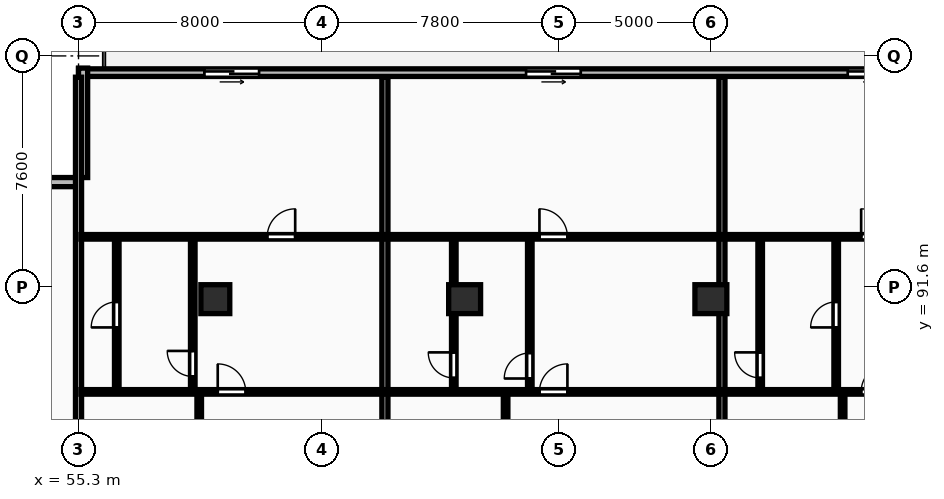
"""IFC4 building model, lengths in metres.
Left out: names, types, materials, properties, quantities, classifications, styles, units other than length and angle.
Written with IfcOpenShell. Run it as: python <this file> out.ifc"""

import sys

from ifc_helpers import new_model, si_unit, direction, frame, frame_2d, origin, origin_2d, place, context, subcontext, project, spatial, rectangle, circle, extrude, element, fill, save


model = new_model("IFC4")
c1 = context("Model", 3, precision=1e-05, world=origin(), true_north=direction((0.0, 1.0)))
c2 = subcontext(c1, "Body", "Model", "MODEL_VIEW")
j1 = project(units=[si_unit("LENGTHUNIT", "METRE"), si_unit("PLANEANGLEUNIT", "RADIAN")], contexts=[c1])
p1 = place(None, origin())
s1 = spatial("IfcSite", under=j1, at=p1, CompositionType="ELEMENT")
p2 = place(p1, origin())
s2 = spatial("IfcBuilding", under=s1, at=p2, CompositionType="ELEMENT")
p3 = place(p2, frame((0.0, 0.0, 24.0)))
s3 = spatial("IfcBuildingStorey", under=s2, at=p3, CompositionType="ELEMENT", Elevation=24.0)
p4 = place(p3, frame((59.8, 91.2, 0.0), z_axis=(0.0, 0.0, 1.0), x_axis=(1.0, 0.0, 0.0)))
e1 = element("IfcColumn", 1, at=p4, inside=s3, PredefinedType="COLUMN", context=c2, shape_type="SweptSolid", body=[
    extrude(circle(Radius=0.475, at=origin_2d()), origin(), (0.0, 0.0, 1.0), 3.25),
])
for number, where, z_axis, x_axis in (
    (2, (68.0, 91.2, 0.0), (0.0, 0.0, 1.0), (1.0, 0.0, 0.0)),
    (3, (76.1, 91.2, 0.0), (0.0, 0.0, 1.0), (1.0, 0.0, 0.0)),
):
    element("IfcColumn", number, at=place(p3, frame(where, z_axis=z_axis, x_axis=x_axis)), inside=s3, PredefinedType="COLUMN", context=c2, shape_type="SweptSolid", body=[
        extrude(rectangle(XDim=1.05, YDim=0.95, at=origin_2d()), origin(), (0.0, 0.0, 1.0), 3.25),
    ])
p5 = place(p3, frame((132.9, 98.65, 0.0), z_axis=(0.0, 0.0, 1.0), x_axis=(-1.0, 0.0, 0.0)))
e4 = element("IfcWall", 4, at=p5, inside=s3, PredefinedType="STANDARD", context=c2, shape_type="SweptSolid", body=[
    extrude(rectangle(XDim=77.6, YDim=0.25, at=frame_2d((38.8, 0.0))), origin(), (0.0, 0.0, 1.0), 2.97),
])
p6 = place(p5, frame((71.661, 0.0, 0.0)))
e5 = element("IfcOpeningElement", 5, at=p6, cuts=e4, PredefinedType="OPENING", context=c2, shape_type="SweptSolid", body=[
    extrude(rectangle(XDim=1.8, YDim=2.2, at=frame_2d((0.9, 1.1))), frame((0.0, 0.135, 0.0), z_axis=(0.0, -1.0, 0.0), x_axis=(1.0, 0.0, 0.0)), (0.0, 0.0, 1.0), 0.27),
])
p7 = place(p5, frame((61.079, 0.0, 0.0)))
e6 = element("IfcOpeningElement", 6, at=p7, cuts=e4, PredefinedType="OPENING", context=c2, shape_type="SweptSolid", body=[
    extrude(rectangle(XDim=1.8, YDim=2.2, at=frame_2d((0.9, 1.1))), frame((0.0, 0.135, 0.0), z_axis=(0.0, -1.0, 0.0), x_axis=(1.0, 0.0, 0.0)), (0.0, 0.0, 1.0), 0.27),
])
p8 = place(p5, frame((50.498, 0.0, 0.0)))
e7 = element("IfcOpeningElement", 7, at=p8, cuts=e4, PredefinedType="OPENING", context=c2, shape_type="SweptSolid", body=[
    extrude(rectangle(XDim=1.8, YDim=2.2, at=frame_2d((0.9, 1.1))), frame((0.0, 0.135, 0.0), z_axis=(0.0, -1.0, 0.0), x_axis=(1.0, 0.0, 0.0)), (0.0, 0.0, 1.0), 0.27),
])
p9 = place(p5, frame((39.412, 0.0, 0.0)))
e8 = element("IfcOpeningElement", 8, at=p9, cuts=e4, PredefinedType="OPENING", context=c2, shape_type="SweptSolid", body=[
    extrude(rectangle(XDim=1.8, YDim=2.2, at=frame_2d((0.9, 1.1))), frame((0.0, 0.135, 0.0), z_axis=(0.0, -1.0, 0.0), x_axis=(1.0, 0.0, 0.0)), (0.0, 0.0, 1.0), 0.27),
])
p10 = place(p5, frame((28.326, 0.0, 0.0)))
e9 = element("IfcOpeningElement", 9, at=p10, cuts=e4, PredefinedType="OPENING", context=c2, shape_type="SweptSolid", body=[
    extrude(rectangle(XDim=1.8, YDim=2.2, at=frame_2d((0.9, 1.1))), frame((0.0, 0.135, 0.0), z_axis=(0.0, -1.0, 0.0), x_axis=(1.0, 0.0, 0.0)), (0.0, 0.0, 1.0), 0.27),
])
p11 = place(p5, frame((17.744, 0.0, 0.0)))
e10 = element("IfcOpeningElement", 10, at=p11, cuts=e4, PredefinedType="OPENING", context=c2, shape_type="SweptSolid", body=[
    extrude(rectangle(XDim=1.8, YDim=2.2, at=frame_2d((0.9, 1.1))), frame((0.0, 0.135, 0.0), z_axis=(0.0, -1.0, 0.0), x_axis=(1.0, 0.0, 0.0)), (0.0, 0.0, 1.0), 0.27),
])
p12 = place(p5, frame((6.901, 0.0, 0.0)))
e11 = element("IfcOpeningElement", 11, at=p12, cuts=e4, PredefinedType="OPENING", context=c2, shape_type="SweptSolid", body=[
    extrude(rectangle(XDim=1.8, YDim=2.2, at=frame_2d((0.9, 1.1))), frame((0.0, 0.135, 0.0), z_axis=(0.0, -1.0, 0.0), x_axis=(1.0, 0.0, 0.0)), (0.0, 0.0, 1.0), 0.27),
])
p13 = place(p5, frame((0.6, 0.0, 0.85)))
e12 = element("IfcOpeningElement", 12, at=p13, cuts=e4, PredefinedType="OPENING", context=c2, shape_type="SweptSolid", body=[
    extrude(rectangle(XDim=1.8, YDim=1.8, at=frame_2d((0.9, 0.9))), frame((0.0, 0.135, 0.0), z_axis=(0.0, -1.0, 0.0), x_axis=(1.0, 0.0, 0.0)), (0.0, 0.0, 1.0), 0.27),
])
for number, where, z_axis, x_axis in (
    (13, (55.45, 98.8, 0.0), (0.0, 0.0, 1.0), (0.0, -1.0, 0.0)),
    (14, (55.3, 95.05, 0.0), (0.0, 0.0, 1.0), (-1.0, 0.0, 0.0)),
):
    element("IfcWall", number, at=place(p3, frame(where, z_axis=z_axis, x_axis=x_axis)), inside=s3, PredefinedType="STANDARD", context=c2, shape_type="SweptSolid", body=[
        extrude(rectangle(XDim=3.6, YDim=0.3, at=frame_2d((1.8, 0.0))), origin(), (0.0, 0.0, 1.0), 2.97),
    ])
for number, where, z_axis, x_axis in (
    (15, (55.3, 69.43, 0.0), (0.0, 0.0, 1.0), (0.0, 1.0, 0.0)),
    (16, (65.378, 69.43, 0.0), (0.0, 0.0, 1.0), (0.0, 1.0, 0.0)),
):
    element("IfcWall", number, at=place(p3, frame(where, z_axis=z_axis, x_axis=x_axis)), inside=s3, PredefinedType="PARTITIONING", context=c2, shape_type="SweptSolid", body=[
        extrude(rectangle(XDim=29.07, YDim=0.2, at=frame_2d((14.535, 0.0))), origin(), (0.0, 0.0, 1.0), 2.97),
    ])
p14 = place(p3, frame((59.27, 69.41, 0.0), z_axis=(0.0, 0.0, 1.0), x_axis=(0.0, 1.0, 0.0)))
e17 = element("IfcWall", 17, at=p14, inside=s3, PredefinedType="PARTITIONING", context=c2, shape_type="SweptSolid", body=[
    extrude(rectangle(XDim=18.7, YDim=0.15, at=frame_2d((9.35, 0.0))), origin(), (0.0, 0.0, 1.0), 2.97),
])
p15 = place(p14, frame((7.59, 0.0, 0.0)))
e18 = element("IfcOpeningElement", 18, at=p15, cuts=e17, PredefinedType="OPENING", context=c2, shape_type="SweptSolid", body=[
    extrude(rectangle(XDim=0.88, YDim=2.06, at=frame_2d((0.44, 1.03))), frame((0.0, 0.085, 0.0), z_axis=(0.0, -1.0, 0.0), x_axis=(1.0, 0.0, 0.0)), (0.0, 0.0, 1.0), 0.17),
])
p16 = place(p3, frame((56.558, 88.19, 0.0), z_axis=(0.0, 0.0, 1.0), x_axis=(0.0, 1.0, 0.0)))
e19 = element("IfcWall", 19, at=p16, inside=s3, PredefinedType="PARTITIONING", context=c2, shape_type="SweptSolid", body=[
    extrude(rectangle(XDim=5.0, YDim=0.15, at=frame_2d((2.5, 0.0))), origin(), (0.0, 0.0, 1.0), 2.97),
])
p17 = place(p16, frame((2.08, 0.0, 0.0)))
e20 = element("IfcOpeningElement", 20, at=p17, cuts=e19, PredefinedType="OPENING", context=c2, shape_type="SweptSolid", body=[
    extrude(rectangle(XDim=0.84, YDim=2.04, at=frame_2d((0.42, 1.02))), frame((0.0, 0.085, 0.0), z_axis=(0.0, -1.0, 0.0), x_axis=(1.0, 0.0, 0.0)), (0.0, 0.0, 1.0), 0.17),
])
p18 = place(p3, frame((59.058, 88.19, 0.0), z_axis=(0.0, 0.0, 1.0), x_axis=(0.0, 1.0, 0.0)))
e21 = element("IfcWall", 21, at=p18, inside=s3, PredefinedType="PARTITIONING", context=c2, shape_type="SweptSolid", body=[
    extrude(rectangle(XDim=5.0, YDim=0.15, at=frame_2d((2.5, 0.0))), origin(), (0.0, 0.0, 1.0), 2.97),
])
p19 = place(p18, frame((0.467, 0.0, 0.0)))
e22 = element("IfcOpeningElement", 22, at=p19, cuts=e21, PredefinedType="OPENING", context=c2, shape_type="SweptSolid", body=[
    extrude(rectangle(XDim=0.84, YDim=2.04, at=frame_2d((0.42, 1.02))), frame((0.0, 0.085, 0.0), z_axis=(0.0, -1.0, 0.0), x_axis=(1.0, 0.0, 0.0)), (0.0, 0.0, 1.0), 0.17),
])
p20 = place(p3, frame((55.38, 88.15, 0.0), z_axis=(0.0, 0.0, 1.0), x_axis=(1.0, 0.0, 0.0)))
e23 = element("IfcWall", 23, at=p20, inside=s3, PredefinedType="PARTITIONING", context=c2, shape_type="SweptSolid", body=[
    extrude(rectangle(XDim=9.918, YDim=0.15, at=frame_2d((4.959, 0.0))), origin(), (0.0, 0.0, 1.0), 2.97),
])
p21 = place(p20, frame((4.499, 0.0, 0.0)))
e24 = element("IfcOpeningElement", 24, at=p21, cuts=e23, PredefinedType="OPENING", context=c2, shape_type="SweptSolid", body=[
    extrude(rectangle(XDim=0.92, YDim=2.08, at=frame_2d((0.46, 1.04))), frame((0.0, 0.085, 0.0), z_axis=(0.0, -1.0, 0.0), x_axis=(1.0, 0.0, 0.0)), (0.0, 0.0, 1.0), 0.17),
])
p22 = place(p3, frame((55.38, 93.25, 0.0), z_axis=(0.0, 0.0, 1.0), x_axis=(1.0, 0.0, 0.0)))
e25 = element("IfcWall", 25, at=p22, inside=s3, PredefinedType="PARTITIONING", context=c2, shape_type="SweptSolid", body=[
    extrude(rectangle(XDim=9.918, YDim=0.15, at=frame_2d((4.959, 0.0))), origin(), (0.0, 0.0, 1.0), 2.97),
])
p23 = place(p22, frame((6.127, 0.0, 0.0)))
e26 = element("IfcOpeningElement", 26, at=p23, cuts=e25, PredefinedType="OPENING", context=c2, shape_type="SweptSolid", body=[
    extrude(rectangle(XDim=0.92, YDim=2.08, at=frame_2d((0.46, 1.04))), frame((0.0, 0.085, 0.0), z_axis=(0.0, -1.0, 0.0), x_axis=(1.0, 0.0, 0.0)), (0.0, 0.0, 1.0), 0.17),
])
p24 = place(p3, frame((76.464, 69.43, 0.0), z_axis=(0.0, 0.0, 1.0), x_axis=(0.0, 1.0, 0.0)))
e27 = element("IfcWall", 27, at=p24, inside=s3, PredefinedType="PARTITIONING", context=c2, shape_type="SweptSolid", body=[
    extrude(rectangle(XDim=29.07, YDim=0.2, at=frame_2d((14.535, 0.0))), origin(), (0.0, 0.0, 1.0), 2.22),
])
p25 = place(p3, frame((69.348, 69.41, 0.0), z_axis=(0.0, 0.0, 1.0), x_axis=(0.0, 1.0, 0.0)))
e28 = element("IfcWall", 28, at=p25, inside=s3, PredefinedType="PARTITIONING", context=c2, shape_type="SweptSolid", body=[
    extrude(rectangle(XDim=18.7, YDim=0.15, at=frame_2d((9.35, 0.0))), origin(), (0.0, 0.0, 1.0), 2.97),
])
p26 = place(p25, frame((7.595, 0.0, 0.0)))
e29 = element("IfcOpeningElement", 29, at=p26, cuts=e28, PredefinedType="OPENING", context=c2, shape_type="SweptSolid", body=[
    extrude(rectangle(XDim=0.88, YDim=2.06, at=frame_2d((0.44, 1.03))), frame((0.0, 0.085, 0.0), z_axis=(0.0, -1.0, 0.0), x_axis=(1.0, 0.0, 0.0)), (0.0, 0.0, 1.0), 0.17),
])
p27 = place(p3, frame((67.644, 88.19, 0.0), z_axis=(0.0, 0.0, 1.0), x_axis=(0.0, 1.0, 0.0)))
e30 = element("IfcWall", 30, at=p27, inside=s3, PredefinedType="PARTITIONING", context=c2, shape_type="SweptSolid", body=[
    extrude(rectangle(XDim=5.0, YDim=0.15, at=frame_2d((2.5, 0.0))), origin(), (0.0, 0.0, 1.0), 2.22),
])
p28 = place(p27, frame((0.419, 0.0, 0.0)))
e31 = element("IfcOpeningElement", 31, at=p28, cuts=e30, PredefinedType="OPENING", context=c2, shape_type="SweptSolid", body=[
    extrude(rectangle(XDim=0.84, YDim=2.04, at=frame_2d((0.42, 1.02))), frame((0.0, 0.085, 0.0), z_axis=(0.0, -1.0, 0.0), x_axis=(1.0, 0.0, 0.0)), (0.0, 0.0, 1.0), 0.17),
])
p29 = place(p3, frame((70.144, 88.19, 0.0), z_axis=(0.0, 0.0, 1.0), x_axis=(0.0, 1.0, 0.0)))
e32 = element("IfcWall", 32, at=p29, inside=s3, PredefinedType="PARTITIONING", context=c2, shape_type="SweptSolid", body=[
    extrude(rectangle(XDim=5.0, YDim=0.15, at=frame_2d((2.5, 0.0))), origin(), (0.0, 0.0, 1.0), 2.97),
])
p30 = place(p29, frame((0.4, 0.0, 0.0)))
e33 = element("IfcOpeningElement", 33, at=p30, cuts=e32, PredefinedType="OPENING", context=c2, shape_type="SweptSolid", body=[
    extrude(rectangle(XDim=0.84, YDim=2.04, at=frame_2d((0.42, 1.02))), frame((0.0, 0.085, 0.0), z_axis=(0.0, -1.0, 0.0), x_axis=(1.0, 0.0, 0.0)), (0.0, 0.0, 1.0), 0.17),
])
p31 = place(p3, frame((65.458, 88.15, 0.0), z_axis=(0.0, 0.0, 1.0), x_axis=(1.0, 0.0, 0.0)))
e34 = element("IfcWall", 34, at=p31, inside=s3, PredefinedType="PARTITIONING", context=c2, shape_type="SweptSolid", body=[
    extrude(rectangle(XDim=10.926, YDim=0.15, at=frame_2d((5.463, 0.0))), origin(), (0.0, 0.0, 1.0), 2.97),
])
p32 = place(p31, frame((5.003, 0.0, 0.0)))
e35 = element("IfcOpeningElement", 35, at=p32, cuts=e34, PredefinedType="OPENING", context=c2, shape_type="SweptSolid", body=[
    extrude(rectangle(XDim=0.92, YDim=2.08, at=frame_2d((0.46, 1.04))), frame((0.0, 0.085, 0.0), z_axis=(0.0, -1.0, 0.0), x_axis=(1.0, 0.0, 0.0)), (0.0, 0.0, 1.0), 0.17),
])
p33 = place(p3, frame((65.458, 93.25, 0.0), z_axis=(0.0, 0.0, 1.0), x_axis=(1.0, 0.0, 0.0)))
e36 = element("IfcWall", 36, at=p33, inside=s3, PredefinedType="PARTITIONING", context=c2, shape_type="SweptSolid", body=[
    extrude(rectangle(XDim=10.926, YDim=0.15, at=frame_2d((5.463, 0.0))), origin(), (0.0, 0.0, 1.0), 2.97),
])
p34 = place(p33, frame((5.003, 0.0, 0.0)))
e37 = element("IfcOpeningElement", 37, at=p34, cuts=e36, PredefinedType="OPENING", context=c2, shape_type="SweptSolid", body=[
    extrude(rectangle(XDim=0.92, YDim=2.08, at=frame_2d((0.46, 1.04))), frame((0.0, 0.085, 0.0), z_axis=(0.0, -1.0, 0.0), x_axis=(1.0, 0.0, 0.0)), (0.0, 0.0, 1.0), 0.17),
])
p35 = place(p3, frame((80.434, 69.41, 0.0), z_axis=(0.0, 0.0, 1.0), x_axis=(0.0, 1.0, 0.0)))
e38 = element("IfcWall", 38, at=p35, inside=s3, PredefinedType="PARTITIONING", context=c2, shape_type="SweptSolid", body=[
    extrude(rectangle(XDim=18.7, YDim=0.15, at=frame_2d((9.35, 0.0))), origin(), (0.0, 0.0, 1.0), 2.97),
])
p36 = place(p35, frame((8.04, 0.0, 0.0)))
e39 = element("IfcOpeningElement", 39, at=p36, cuts=e38, PredefinedType="OPENING", context=c2, shape_type="SweptSolid", body=[
    extrude(rectangle(XDim=0.88, YDim=2.06, at=frame_2d((0.44, 1.03))), frame((0.0, 0.085, 0.0), z_axis=(0.0, -1.0, 0.0), x_axis=(1.0, 0.0, 0.0)), (0.0, 0.0, 1.0), 0.17),
])
p37 = place(p3, frame((77.721, 88.19, 0.0), z_axis=(0.0, 0.0, 1.0), x_axis=(0.0, 1.0, 0.0)))
e40 = element("IfcWall", 40, at=p37, inside=s3, PredefinedType="PARTITIONING", context=c2, shape_type="SweptSolid", body=[
    extrude(rectangle(XDim=5.0, YDim=0.15, at=frame_2d((2.5, 0.0))), origin(), (0.0, 0.0, 1.0), 2.97),
])
p38 = place(p37, frame((0.419, 0.0, 0.0)))
e41 = element("IfcOpeningElement", 41, at=p38, cuts=e40, PredefinedType="OPENING", context=c2, shape_type="SweptSolid", body=[
    extrude(rectangle(XDim=0.84, YDim=2.04, at=frame_2d((0.42, 1.02))), frame((0.0, 0.085, 0.0), z_axis=(0.0, -1.0, 0.0), x_axis=(1.0, 0.0, 0.0)), (0.0, 0.0, 1.0), 0.17),
])
p39 = place(p3, frame((80.221, 88.19, 0.0), z_axis=(0.0, 0.0, 1.0), x_axis=(0.0, 1.0, 0.0)))
e42 = element("IfcWall", 42, at=p39, inside=s3, PredefinedType="PARTITIONING", context=c2, shape_type="SweptSolid", body=[
    extrude(rectangle(XDim=5.0, YDim=0.15, at=frame_2d((2.5, 0.0))), origin(), (0.0, 0.0, 1.0), 2.97),
])
p40 = place(p39, frame((2.08, 0.0, 0.0)))
e43 = element("IfcOpeningElement", 43, at=p40, cuts=e42, PredefinedType="OPENING", context=c2, shape_type="SweptSolid", body=[
    extrude(rectangle(XDim=0.84, YDim=2.04, at=frame_2d((0.42, 1.02))), frame((0.0, 0.085, 0.0), z_axis=(0.0, -1.0, 0.0), x_axis=(1.0, 0.0, 0.0)), (0.0, 0.0, 1.0), 0.17),
])
p41 = place(p3, frame((76.544, 88.15, 0.0), z_axis=(0.0, 0.0, 1.0), x_axis=(1.0, 0.0, 0.0)))
e44 = element("IfcWall", 44, at=p41, inside=s3, PredefinedType="PARTITIONING", context=c2, shape_type="SweptSolid", body=[
    extrude(rectangle(XDim=9.918, YDim=0.15, at=frame_2d((4.959, 0.0))), origin(), (0.0, 0.0, 1.0), 2.97),
])
p42 = place(p41, frame((4.499, 0.0, 0.0)))
e45 = element("IfcOpeningElement", 45, at=p42, cuts=e44, PredefinedType="OPENING", context=c2, shape_type="SweptSolid", body=[
    extrude(rectangle(XDim=0.92, YDim=2.08, at=frame_2d((0.46, 1.04))), frame((0.0, 0.085, 0.0), z_axis=(0.0, -1.0, 0.0), x_axis=(1.0, 0.0, 0.0)), (0.0, 0.0, 1.0), 0.17),
])
p43 = place(p3, frame((76.544, 93.25, 0.0), z_axis=(0.0, 0.0, 1.0), x_axis=(1.0, 0.0, 0.0)))
e46 = element("IfcWall", 46, at=p43, inside=s3, PredefinedType="PARTITIONING", context=c2, shape_type="SweptSolid", body=[
    extrude(rectangle(XDim=9.918, YDim=0.15, at=frame_2d((4.959, 0.0))), origin(), (0.0, 0.0, 1.0), 2.97),
])
p44 = place(p43, frame((4.499, 0.0, 0.0)))
e47 = element("IfcOpeningElement", 47, at=p44, cuts=e46, PredefinedType="OPENING", context=c2, shape_type="SweptSolid", body=[
    extrude(rectangle(XDim=0.92, YDim=2.08, at=frame_2d((0.46, 1.04))), frame((0.0, 0.085, 0.0), z_axis=(0.0, -1.0, 0.0), x_axis=(1.0, 0.0, 0.0)), (0.0, 0.0, 1.0), 0.17),
])
p45 = place(p6, origin())
e48 = element("IfcDoor", 48, at=p45, inside=s3, OperationType="SLIDING_TO_LEFT", PredefinedType="DOOR", context=c2, shape_type="SweptSolid", body=[
    extrude(rectangle(XDim=1.8, YDim=2.2, at=frame_2d((0.9, 1.1))), frame((0.0, 0.025, 0.0), z_axis=(0.0, -1.0, 0.0), x_axis=(1.0, 0.0, 0.0)), (0.0, 0.0, 1.0), 0.05),
])
fill(e5, e48)
p46 = place(p7, origin())
e49 = element("IfcDoor", 49, at=p46, inside=s3, OperationType="SLIDING_TO_LEFT", PredefinedType="DOOR", context=c2, shape_type="SweptSolid", body=[
    extrude(rectangle(XDim=1.8, YDim=2.2, at=frame_2d((0.9, 1.1))), frame((0.0, 0.025, 0.0), z_axis=(0.0, -1.0, 0.0), x_axis=(1.0, 0.0, 0.0)), (0.0, 0.0, 1.0), 0.05),
])
fill(e6, e49)
p47 = place(p8, origin())
e50 = element("IfcDoor", 50, at=p47, inside=s3, OperationType="SLIDING_TO_LEFT", PredefinedType="DOOR", context=c2, shape_type="SweptSolid", body=[
    extrude(rectangle(XDim=1.8, YDim=2.2, at=frame_2d((0.9, 1.1))), frame((0.0, 0.025, 0.0), z_axis=(0.0, -1.0, 0.0), x_axis=(1.0, 0.0, 0.0)), (0.0, 0.0, 1.0), 0.05),
])
fill(e7, e50)
p48 = place(p17, origin())
e51 = element("IfcDoor", 51, at=p48, inside=s3, OperationType="SINGLE_SWING_LEFT", PredefinedType="DOOR", context=c2, shape_type="SweptSolid", body=[
    extrude(rectangle(XDim=0.84, YDim=2.04, at=frame_2d((0.42, 1.02))), frame((0.0, 0.025, 0.0), z_axis=(0.0, -1.0, 0.0), x_axis=(1.0, 0.0, 0.0)), (0.0, 0.0, 1.0), 0.05),
])
fill(e20, e51)
p49 = place(p19, origin())
e52 = element("IfcDoor", 52, at=p49, inside=s3, OperationType="SINGLE_SWING_RIGHT", PredefinedType="DOOR", context=c2, shape_type="SweptSolid", body=[
    extrude(rectangle(XDim=0.84, YDim=2.04, at=frame_2d((0.42, 1.02))), frame((0.0, 0.025, 0.0), z_axis=(0.0, -1.0, 0.0), x_axis=(1.0, 0.0, 0.0)), (0.0, 0.0, 1.0), 0.05),
])
fill(e22, e52)
p50 = place(p21, origin())
e53 = element("IfcDoor", 53, at=p50, inside=s3, OperationType="SINGLE_SWING_LEFT", PredefinedType="DOOR", context=c2, shape_type="SweptSolid", body=[
    extrude(rectangle(XDim=0.92, YDim=2.08, at=frame_2d((0.46, 1.04))), frame((0.0, 0.025, 0.0), z_axis=(0.0, -1.0, 0.0), x_axis=(1.0, 0.0, 0.0)), (0.0, 0.0, 1.0), 0.05),
])
fill(e24, e53)
p51 = place(p23, origin())
e54 = element("IfcDoor", 54, at=p51, inside=s3, OperationType="SINGLE_SWING_RIGHT", PredefinedType="DOOR", context=c2, shape_type="SweptSolid", body=[
    extrude(rectangle(XDim=0.92, YDim=2.08, at=frame_2d((0.46, 1.04))), frame((0.0, 0.025, 0.0), z_axis=(0.0, -1.0, 0.0), x_axis=(1.0, 0.0, 0.0)), (0.0, 0.0, 1.0), 0.05),
])
fill(e26, e54)
p52 = place(p28, origin())
e55 = element("IfcDoor", 55, at=p52, inside=s3, OperationType="SINGLE_SWING_RIGHT", PredefinedType="DOOR", context=c2, shape_type="SweptSolid", body=[
    extrude(rectangle(XDim=0.84, YDim=2.04, at=frame_2d((0.42, 1.02))), frame((0.0, 0.025, 0.0), z_axis=(0.0, -1.0, 0.0), x_axis=(1.0, 0.0, 0.0)), (0.0, 0.0, 1.0), 0.05),
])
fill(e31, e55)
p53 = place(p30, origin())
e56 = element("IfcDoor", 56, at=p53, inside=s3, OperationType="SINGLE_SWING_LEFT", PredefinedType="DOOR", context=c2, shape_type="SweptSolid", body=[
    extrude(rectangle(XDim=0.84, YDim=2.04, at=frame_2d((0.42, 1.02))), frame((0.0, 0.025, 0.0), z_axis=(0.0, -1.0, 0.0), x_axis=(1.0, 0.0, 0.0)), (0.0, 0.0, 1.0), 0.05),
])
fill(e33, e56)
p54 = place(p32, origin())
e57 = element("IfcDoor", 57, at=p54, inside=s3, OperationType="SINGLE_SWING_RIGHT", PredefinedType="DOOR", context=c2, shape_type="SweptSolid", body=[
    extrude(rectangle(XDim=0.92, YDim=2.08, at=frame_2d((0.46, 1.04))), frame((0.0, 0.025, 0.0), z_axis=(0.0, -1.0, 0.0), x_axis=(1.0, 0.0, 0.0)), (0.0, 0.0, 1.0), 0.05),
])
fill(e35, e57)
p55 = place(p34, origin())
e58 = element("IfcDoor", 58, at=p55, inside=s3, OperationType="SINGLE_SWING_LEFT", PredefinedType="DOOR", context=c2, shape_type="SweptSolid", body=[
    extrude(rectangle(XDim=0.92, YDim=2.08, at=frame_2d((0.46, 1.04))), frame((0.0, 0.025, 0.0), z_axis=(0.0, -1.0, 0.0), x_axis=(1.0, 0.0, 0.0)), (0.0, 0.0, 1.0), 0.05),
])
fill(e37, e58)
p56 = place(p38, origin())
e59 = element("IfcDoor", 59, at=p56, inside=s3, OperationType="SINGLE_SWING_RIGHT", PredefinedType="DOOR", context=c2, shape_type="SweptSolid", body=[
    extrude(rectangle(XDim=0.84, YDim=2.04, at=frame_2d((0.42, 1.02))), frame((0.0, 0.025, 0.0), z_axis=(0.0, -1.0, 0.0), x_axis=(1.0, 0.0, 0.0)), (0.0, 0.0, 1.0), 0.05),
])
fill(e41, e59)
p57 = place(p40, origin())
e60 = element("IfcDoor", 60, at=p57, inside=s3, OperationType="SINGLE_SWING_LEFT", PredefinedType="DOOR", context=c2, shape_type="SweptSolid", body=[
    extrude(rectangle(XDim=0.84, YDim=2.04, at=frame_2d((0.42, 1.02))), frame((0.0, 0.025, 0.0), z_axis=(0.0, -1.0, 0.0), x_axis=(1.0, 0.0, 0.0)), (0.0, 0.0, 1.0), 0.05),
])
fill(e43, e60)
p58 = place(p42, origin())
e61 = element("IfcDoor", 61, at=p58, inside=s3, OperationType="SINGLE_SWING_RIGHT", PredefinedType="DOOR", context=c2, shape_type="SweptSolid", body=[
    extrude(rectangle(XDim=0.92, YDim=2.08, at=frame_2d((0.46, 1.04))), frame((0.0, 0.025, 0.0), z_axis=(0.0, -1.0, 0.0), x_axis=(1.0, 0.0, 0.0)), (0.0, 0.0, 1.0), 0.05),
])
fill(e45, e61)
p59 = place(p44, origin())
e62 = element("IfcDoor", 62, at=p59, inside=s3, OperationType="SINGLE_SWING_LEFT", PredefinedType="DOOR", context=c2, shape_type="SweptSolid", body=[
    extrude(rectangle(XDim=0.92, YDim=2.08, at=frame_2d((0.46, 1.04))), frame((0.0, 0.025, 0.0), z_axis=(0.0, -1.0, 0.0), x_axis=(1.0, 0.0, 0.0)), (0.0, 0.0, 1.0), 0.05),
])
fill(e47, e62)
save(model, sys.argv[1])
